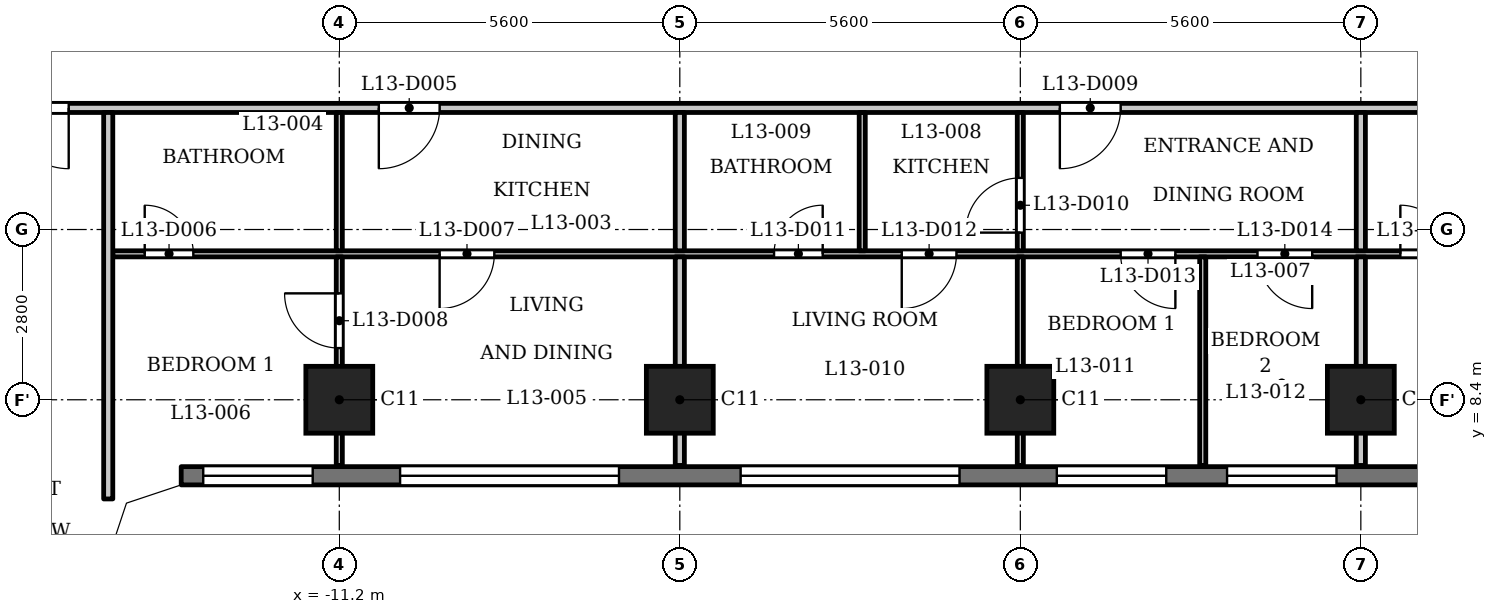
"""IFC4 building model, lengths in metres.
Left out: names, types, materials, properties, quantities, classifications, styles, units other than length and angle.
Written with IfcOpenShell. Run it as: python <this file> out.ifc"""

import sys

from ifc_helpers import new_model, si_unit, direction, frame, frame_2d, origin, origin_2d, place, context, subcontext, project, spatial, polyline, rectangle, outline, extrude, element, fill, save


model = new_model("IFC4")
c1 = context("Model", 3, precision=1e-05, world=origin(), true_north=direction((0.0, 1.0)))
c2 = subcontext(c1, "Body", "Model", "MODEL_VIEW")
j1 = project(units=[si_unit("LENGTHUNIT", "METRE"), si_unit("PLANEANGLEUNIT", "RADIAN")], contexts=[c1])
p1 = place(None, origin())
s1 = spatial("IfcSite", under=j1, at=p1, CompositionType="ELEMENT")
p2 = place(p1, origin())
s2 = spatial("IfcBuilding", under=s1, at=p2, CompositionType="ELEMENT")
p3 = place(p2, frame((0.0, 0.0, 55.0)))
s3 = spatial("IfcBuildingStorey", under=s2, at=p3, CompositionType="ELEMENT", Elevation=55.0)
for number, where, z_axis, x_axis in (
    (1, (-11.2, 8.4, 0.0), (0.0, 0.0, 1.0), (1.0, 0.0, 0.0)),
    (2, (-5.6, 8.4, 0.0), (0.0, 0.0, 1.0), (1.0, 0.0, 0.0)),
    (3, (0.0, 8.4, 0.0), (0.0, 0.0, 1.0), (1.0, 0.0, 0.0)),
    (4, (5.6, 8.4, 0.0), (0.0, 0.0, 1.0), (1.0, 0.0, 0.0)),
):
    element("IfcColumn", number, at=place(p3, frame(where, z_axis=z_axis, x_axis=x_axis)), inside=s3, PredefinedType="COLUMN", context=c2, shape_type="SweptSolid", body=[
        extrude(rectangle(XDim=1.1, YDim=1.1, at=origin_2d()), origin(), (0.0, 0.0, 1.0), 3.5),
    ])
p4 = place(p3, frame((-13.8, 7.15, 0.0), z_axis=(0.0, 0.0, 1.0), x_axis=(1.0, 0.0, 0.0)))
e5 = element("IfcWall", 5, at=p4, inside=s3, PredefinedType="SOLIDWALL", context=c2, shape_type="SweptSolid", body=[
    extrude(rectangle(XDim=27.6, YDim=0.3, at=frame_2d((13.8, 0.0))), origin(), (0.0, 0.0, 1.0), 3.2),
])
p5 = place(p4, frame((0.363, 0.0, 0.9)))
e6 = element("IfcOpeningElement", 6, at=p5, cuts=e5, PredefinedType="OPENING", context=c2, shape_type="SweptSolid", body=[
    extrude(rectangle(XDim=1.8, YDim=1.25, at=frame_2d((0.9, 0.625))), frame((0.0, 0.16, 0.0), z_axis=(0.0, -1.0, 0.0), x_axis=(1.0, 0.0, 0.0)), (0.0, 0.0, 1.0), 0.32),
])
p6 = place(p4, frame((3.6, 0.0, 1.2)))
e7 = element("IfcOpeningElement", 7, at=p6, cuts=e5, PredefinedType="OPENING", context=c2, shape_type="SweptSolid", body=[
    extrude(rectangle(XDim=3.6, YDim=0.95, at=frame_2d((1.8, 0.475))), frame((0.0, 0.16, 0.0), z_axis=(0.0, -1.0, 0.0), x_axis=(1.0, 0.0, 0.0)), (0.0, 0.0, 1.0), 0.32),
])
p7 = place(p4, frame((9.2, 0.0, 1.2)))
e8 = element("IfcOpeningElement", 8, at=p7, cuts=e5, PredefinedType="OPENING", context=c2, shape_type="SweptSolid", body=[
    extrude(rectangle(XDim=3.6, YDim=0.95, at=frame_2d((1.8, 0.475))), frame((0.0, 0.16, 0.0), z_axis=(0.0, -1.0, 0.0), x_axis=(1.0, 0.0, 0.0)), (0.0, 0.0, 1.0), 0.32),
])
p8 = place(p4, frame((14.4, 0.0, 0.9)))
e9 = element("IfcOpeningElement", 9, at=p8, cuts=e5, PredefinedType="OPENING", context=c2, shape_type="SweptSolid", body=[
    extrude(rectangle(XDim=1.8, YDim=1.25, at=frame_2d((0.9, 0.625))), frame((0.0, 0.16, 0.0), z_axis=(0.0, -1.0, 0.0), x_axis=(1.0, 0.0, 0.0)), (0.0, 0.0, 1.0), 0.32),
])
p9 = place(p4, frame((17.2, 0.0, 0.9)))
e10 = element("IfcOpeningElement", 10, at=p9, cuts=e5, PredefinedType="OPENING", context=c2, shape_type="SweptSolid", body=[
    extrude(rectangle(XDim=1.8, YDim=1.25, at=frame_2d((0.9, 0.625))), frame((0.0, 0.16, 0.0), z_axis=(0.0, -1.0, 0.0), x_axis=(1.0, 0.0, 0.0)), (0.0, 0.0, 1.0), 0.32),
])
p10 = place(p4, frame((20.4, 0.0, 1.2)))
e11 = element("IfcOpeningElement", 11, at=p10, cuts=e5, PredefinedType="OPENING", context=c2, shape_type="SweptSolid", body=[
    extrude(rectangle(XDim=3.6, YDim=0.95, at=frame_2d((1.8, 0.475))), frame((0.0, 0.16, 0.0), z_axis=(0.0, -1.0, 0.0), x_axis=(1.0, 0.0, 0.0)), (0.0, 0.0, 1.0), 0.32),
])
p11 = place(p4, frame((25.438, 0.0, 0.9)))
e12 = element("IfcOpeningElement", 12, at=p11, cuts=e5, PredefinedType="OPENING", context=c2, shape_type="SweptSolid", body=[
    extrude(rectangle(XDim=1.8, YDim=1.25, at=frame_2d((0.9, 0.625))), frame((0.0, 0.16, 0.0), z_axis=(0.0, -1.0, 0.0), x_axis=(1.0, 0.0, 0.0)), (0.0, 0.0, 1.0), 0.32),
])
p12 = place(p3, frame((-14.925, 10.8, 0.0), z_axis=(0.0, 0.0, 1.0), x_axis=(1.0, 0.0, 0.0)))
e13 = element("IfcWall", 13, at=p12, inside=s3, PredefinedType="PARTITIONING", context=c2, shape_type="SweptSolid", body=[
    extrude(rectangle(XDim=29.85, YDim=0.1, at=frame_2d((14.925, 0.0))), origin(), (0.0, 0.0, 1.0), 3.2),
])
p13 = place(p12, frame((0.525, 0.0, 0.0)))
e14 = element("IfcOpeningElement", 14, at=p13, cuts=e13, PredefinedType="OPENING", context=c2, shape_type="SweptSolid", body=[
    extrude(rectangle(XDim=0.8, YDim=2.1, at=frame_2d((0.4, 1.05))), frame((0.0, 0.06, 0.0), z_axis=(0.0, -1.0, 0.0), x_axis=(1.0, 0.0, 0.0)), (0.0, 0.0, 1.0), 0.12),
])
p14 = place(p12, frame((5.375, 0.0, 0.0)))
e15 = element("IfcOpeningElement", 15, at=p14, cuts=e13, PredefinedType="OPENING", context=c2, shape_type="SweptSolid", body=[
    extrude(rectangle(XDim=0.9, YDim=2.1, at=frame_2d((0.45, 1.05))), frame((0.0, 0.06, 0.0), z_axis=(0.0, -1.0, 0.0), x_axis=(1.0, 0.0, 0.0)), (0.0, 0.0, 1.0), 0.12),
])
p15 = place(p12, frame((10.875, 0.0, 0.0)))
e16 = element("IfcOpeningElement", 16, at=p15, cuts=e13, PredefinedType="OPENING", context=c2, shape_type="SweptSolid", body=[
    extrude(rectangle(XDim=0.8, YDim=2.1, at=frame_2d((0.4, 1.05))), frame((0.0, 0.06, 0.0), z_axis=(0.0, -1.0, 0.0), x_axis=(1.0, 0.0, 0.0)), (0.0, 0.0, 1.0), 0.12),
])
p16 = place(p12, frame((12.975, 0.0, 0.0)))
e17 = element("IfcOpeningElement", 17, at=p16, cuts=e13, PredefinedType="OPENING", context=c2, shape_type="SweptSolid", body=[
    extrude(rectangle(XDim=0.9, YDim=2.1, at=frame_2d((0.45, 1.05))), frame((0.0, 0.06, 0.0), z_axis=(0.0, -1.0, 0.0), x_axis=(1.0, 0.0, 0.0)), (0.0, 0.0, 1.0), 0.12),
])
p17 = place(p12, frame((16.575, 0.0, 0.0)))
e18 = element("IfcOpeningElement", 18, at=p17, cuts=e13, PredefinedType="OPENING", context=c2, shape_type="SweptSolid", body=[
    extrude(rectangle(XDim=0.9, YDim=2.1, at=frame_2d((0.45, 1.05))), frame((0.0, 0.06, 0.0), z_axis=(0.0, -1.0, 0.0), x_axis=(1.0, 0.0, 0.0)), (0.0, 0.0, 1.0), 0.12),
])
p18 = place(p12, frame((18.825, 0.0, 0.0)))
e19 = element("IfcOpeningElement", 19, at=p18, cuts=e13, PredefinedType="OPENING", context=c2, shape_type="SweptSolid", body=[
    extrude(rectangle(XDim=0.9, YDim=2.1, at=frame_2d((0.45, 1.05))), frame((0.0, 0.06, 0.0), z_axis=(0.0, -1.0, 0.0), x_axis=(1.0, 0.0, 0.0)), (0.0, 0.0, 1.0), 0.12),
])
p19 = place(p12, frame((21.175, 0.0, 0.0)))
e20 = element("IfcOpeningElement", 20, at=p19, cuts=e13, PredefinedType="OPENING", context=c2, shape_type="SweptSolid", body=[
    extrude(rectangle(XDim=0.8, YDim=2.1, at=frame_2d((0.4, 1.05))), frame((0.0, 0.06, 0.0), z_axis=(0.0, -1.0, 0.0), x_axis=(1.0, 0.0, 0.0)), (0.0, 0.0, 1.0), 0.12),
])
p20 = place(p12, frame((27.775, 0.0, 0.0)))
e21 = element("IfcOpeningElement", 21, at=p20, cuts=e13, PredefinedType="OPENING", context=c2, shape_type="SweptSolid", body=[
    extrude(rectangle(XDim=0.9, YDim=2.1, at=frame_2d((0.45, 1.05))), frame((0.0, 0.06, 0.0), z_axis=(0.0, -1.0, 0.0), x_axis=(1.0, 0.0, 0.0)), (0.0, 0.0, 1.0), 0.12),
])
p21 = place(p3, frame((-17.4, 13.2, 0.0), z_axis=(0.0, 0.0, 1.0), x_axis=(1.0, 0.0, 0.0)))
e22 = element("IfcWall", 22, at=p21, inside=s3, PredefinedType="PARTITIONING", context=c2, shape_type="SweptSolid", body=[
    extrude(rectangle(XDim=34.8, YDim=0.15, at=frame_2d((17.4, 0.0))), origin(), (0.0, 0.0, 1.0), 3.2),
])
p22 = place(p21, frame((0.75, 0.0, 0.0)))
e23 = element("IfcOpeningElement", 23, at=p22, cuts=e22, PredefinedType="OPENING", context=c2, shape_type="SweptSolid", body=[
    extrude(rectangle(XDim=1.0, YDim=2.1, at=frame_2d((0.5, 1.05))), frame((0.0, 0.085, 0.0), z_axis=(0.0, -1.0, 0.0), x_axis=(1.0, 0.0, 0.0)), (0.0, 0.0, 1.0), 0.17),
])
p23 = place(p21, frame((33.15, 0.0, 0.0)))
e24 = element("IfcOpeningElement", 24, at=p23, cuts=e22, PredefinedType="OPENING", context=c2, shape_type="SweptSolid", body=[
    extrude(rectangle(XDim=1.0, YDim=2.1, at=frame_2d((0.5, 1.05))), frame((0.0, 0.085, 0.0), z_axis=(0.0, -1.0, 0.0), x_axis=(1.0, 0.0, 0.0)), (0.0, 0.0, 1.0), 0.17),
])
p24 = place(p21, frame((6.85, 0.0, 0.0)))
e25 = element("IfcOpeningElement", 25, at=p24, cuts=e22, PredefinedType="OPENING", context=c2, shape_type="SweptSolid", body=[
    extrude(rectangle(XDim=1.0, YDim=2.1, at=frame_2d((0.5, 1.05))), frame((0.0, 0.085, 0.0), z_axis=(0.0, -1.0, 0.0), x_axis=(1.0, 0.0, 0.0)), (0.0, 0.0, 1.0), 0.17),
])
p25 = place(p21, frame((18.05, 0.0, 0.0)))
e26 = element("IfcOpeningElement", 26, at=p25, cuts=e22, PredefinedType="OPENING", context=c2, shape_type="SweptSolid", body=[
    extrude(rectangle(XDim=1.0, YDim=2.1, at=frame_2d((0.5, 1.05))), frame((0.0, 0.085, 0.0), z_axis=(0.0, -1.0, 0.0), x_axis=(1.0, 0.0, 0.0)), (0.0, 0.0, 1.0), 0.17),
])
p26 = place(p21, frame((29.25, 0.0, 0.0)))
e27 = element("IfcOpeningElement", 27, at=p26, cuts=e22, PredefinedType="OPENING", context=c2, shape_type="SweptSolid", body=[
    extrude(rectangle(XDim=1.0, YDim=2.1, at=frame_2d((0.5, 1.05))), frame((0.0, 0.085, 0.0), z_axis=(0.0, -1.0, 0.0), x_axis=(1.0, 0.0, 0.0)), (0.0, 0.0, 1.0), 0.17),
])
p27 = place(p3, frame((-15.0, 6.769, 0.0), z_axis=(0.0, 0.0, 1.0), x_axis=(0.0, 1.0, 0.0)))
e28 = element("IfcWall", 28, at=p27, inside=s3, PredefinedType="PARTITIONING", context=c2, shape_type="SweptSolid", body=[
    extrude(rectangle(XDim=6.356, YDim=0.15, at=frame_2d((3.178, 0.0))), origin(), (0.0, 0.0, 1.0), 3.2),
])
p28 = place(p3, frame((-11.2, 7.32, 0.0), z_axis=(0.0, 0.0, 1.0), x_axis=(0.0, 1.0, 0.0)))
e29 = element("IfcWall", 29, at=p28, inside=s3, PredefinedType="PARTITIONING", context=c2, shape_type="SweptSolid", body=[
    extrude(rectangle(XDim=3.43, YDim=0.1, at=frame_2d((1.715, 0.0))), origin(), (0.0, 0.0, 1.0), 3.2),
])
p29 = place(p28, frame((1.93, 0.0, 0.0)))
e30 = element("IfcOpeningElement", 30, at=p29, cuts=e29, PredefinedType="OPENING", context=c2, shape_type="SweptSolid", body=[
    extrude(rectangle(XDim=0.9, YDim=2.1, at=frame_2d((0.45, 1.05))), frame((0.0, 0.06, 0.0), z_axis=(0.0, -1.0, 0.0), x_axis=(1.0, 0.0, 0.0)), (0.0, 0.0, 1.0), 0.12),
])
p30 = place(p3, frame((-11.2, 10.85, 0.0), z_axis=(0.0, 0.0, 1.0), x_axis=(0.0, 1.0, 0.0)))
e31 = element("IfcWall", 31, at=p30, inside=s3, PredefinedType="PARTITIONING", context=c2, shape_type="SweptSolid", body=[
    extrude(rectangle(XDim=2.275, YDim=0.1, at=frame_2d((1.137, 0.0))), origin(), (0.0, 0.0, 1.0), 3.2),
])
p31 = place(p3, frame((-5.6, 7.32, 0.0), z_axis=(0.0, 0.0, 1.0), x_axis=(0.0, 1.0, 0.0)))
e32 = element("IfcWall", 32, at=p31, inside=s3, PredefinedType="PARTITIONING", context=c2, shape_type="SweptSolid", body=[
    extrude(rectangle(XDim=3.43, YDim=0.15, at=frame_2d((1.715, 0.0))), origin(), (0.0, 0.0, 1.0), 3.2),
])
p32 = place(p3, frame((-5.6, 10.85, 0.0), z_axis=(0.0, 0.0, 1.0), x_axis=(0.0, 1.0, 0.0)))
e33 = element("IfcWall", 33, at=p32, inside=s3, PredefinedType="PARTITIONING", context=c2, shape_type="SweptSolid", body=[
    extrude(rectangle(XDim=2.275, YDim=0.15, at=frame_2d((1.137, 0.0))), origin(), (0.0, 0.0, 1.0), 3.2),
])
p33 = place(p3, frame((-2.6, 10.85, 0.0), z_axis=(0.0, 0.0, 1.0), x_axis=(0.0, 1.0, 0.0)))
e34 = element("IfcWall", 34, at=p33, inside=s3, PredefinedType="PARTITIONING", context=c2, shape_type="SweptSolid", body=[
    extrude(rectangle(XDim=2.275, YDim=0.1, at=frame_2d((1.137, 0.0))), origin(), (0.0, 0.0, 1.0), 3.2),
])
p34 = place(p3, frame((0.0, 7.32, 0.0), z_axis=(0.0, 0.0, 1.0), x_axis=(0.0, 1.0, 0.0)))
e35 = element("IfcWall", 35, at=p34, inside=s3, PredefinedType="PARTITIONING", context=c2, shape_type="SweptSolid", body=[
    extrude(rectangle(XDim=3.43, YDim=0.1, at=frame_2d((1.715, 0.0))), origin(), (0.0, 0.0, 1.0), 3.2),
])
p35 = place(p3, frame((0.0, 10.85, 0.0), z_axis=(0.0, 0.0, 1.0), x_axis=(0.0, 1.0, 0.0)))
e36 = element("IfcWall", 36, at=p35, inside=s3, PredefinedType="PARTITIONING", context=c2, shape_type="SweptSolid", body=[
    extrude(rectangle(XDim=2.275, YDim=0.1, at=frame_2d((1.137, 0.0))), origin(), (0.0, 0.0, 1.0), 3.2),
])
p36 = place(p35, frame((0.299, 0.0, 0.0)))
e37 = element("IfcOpeningElement", 37, at=p36, cuts=e36, PredefinedType="OPENING", context=c2, shape_type="SweptSolid", body=[
    extrude(rectangle(XDim=0.9, YDim=2.1, at=frame_2d((0.45, 1.05))), frame((0.0, 0.06, 0.0), z_axis=(0.0, -1.0, 0.0), x_axis=(1.0, 0.0, 0.0)), (0.0, 0.0, 1.0), 0.12),
])
p37 = place(p3, frame((3.0, 7.32, 0.0), z_axis=(0.0, 0.0, 1.0), x_axis=(0.0, 1.0, 0.0)))
e38 = element("IfcWall", 38, at=p37, inside=s3, PredefinedType="PARTITIONING", context=c2, shape_type="SweptSolid", body=[
    extrude(rectangle(XDim=3.43, YDim=0.1, at=frame_2d((1.715, 0.0))), origin(), (0.0, 0.0, 1.0), 3.2),
])
p38 = place(p3, frame((5.6, 7.32, 0.0), z_axis=(0.0, 0.0, 1.0), x_axis=(0.0, 1.0, 0.0)))
e39 = element("IfcWall", 39, at=p38, inside=s3, PredefinedType="PARTITIONING", context=c2, shape_type="SweptSolid", body=[
    extrude(rectangle(XDim=3.43, YDim=0.15, at=frame_2d((1.715, 0.0))), origin(), (0.0, 0.0, 1.0), 3.2),
])
p39 = place(p3, frame((5.6, 10.85, 0.0), z_axis=(0.0, 0.0, 1.0), x_axis=(0.0, 1.0, 0.0)))
e40 = element("IfcWall", 40, at=p39, inside=s3, PredefinedType="PARTITIONING", context=c2, shape_type="SweptSolid", body=[
    extrude(rectangle(XDim=2.275, YDim=0.15, at=frame_2d((1.137, 0.0))), origin(), (0.0, 0.0, 1.0), 3.2),
])
p40 = place(p3, origin())
e41 = element("IfcWall", 41, at=p40, inside=s3, PredefinedType="SOLIDWALL", context=c2, shape_type="SweptSolid", body=[
    extrude(outline(polyline([(-13.849, 7.3), (-14.937, 6.937), (-15.3, 5.849), (-15.3, 5.8), (-15.0, 5.8), (-14.7, 6.7), (-13.8, 7.0), (-13.8, 7.3), (-13.849, 7.3)])), origin(), (0.0, 0.0, 1.0), 3.2),
])
p41 = place(p22, origin())
e42 = element("IfcDoor", 42, at=p41, inside=s3, OperationType="SINGLE_SWING_RIGHT", PredefinedType="DOOR", context=c2, shape_type="SweptSolid", body=[
    extrude(rectangle(XDim=1.0, YDim=2.1, at=frame_2d((0.5, 1.05))), frame((0.0, 0.025, 0.0), z_axis=(0.0, -1.0, 0.0), x_axis=(1.0, 0.0, 0.0)), (0.0, 0.0, 1.0), 0.05),
])
fill(e23, e42)
p42 = place(p24, origin())
e43 = element("IfcDoor", 43, at=p42, inside=s3, OperationType="SINGLE_SWING_LEFT", PredefinedType="DOOR", context=c2, shape_type="SweptSolid", body=[
    extrude(rectangle(XDim=1.0, YDim=2.1, at=frame_2d((0.5, 1.05))), frame((0.0, 0.025, 0.0), z_axis=(0.0, -1.0, 0.0), x_axis=(1.0, 0.0, 0.0)), (0.0, 0.0, 1.0), 0.05),
])
fill(e25, e43)
p43 = place(p13, origin())
e44 = element("IfcDoor", 44, at=p43, inside=s3, OperationType="SINGLE_SWING_RIGHT", PredefinedType="DOOR", context=c2, shape_type="SweptSolid", body=[
    extrude(rectangle(XDim=0.8, YDim=2.1, at=frame_2d((0.4, 1.05))), frame((0.0, 0.025, 0.0), z_axis=(0.0, -1.0, 0.0), x_axis=(1.0, 0.0, 0.0)), (0.0, 0.0, 1.0), 0.05),
])
fill(e14, e44)
p44 = place(p14, origin())
e45 = element("IfcDoor", 45, at=p44, inside=s3, OperationType="SINGLE_SWING_LEFT", PredefinedType="DOOR", context=c2, shape_type="SweptSolid", body=[
    extrude(rectangle(XDim=0.9, YDim=2.1, at=frame_2d((0.45, 1.05))), frame((0.0, 0.025, 0.0), z_axis=(0.0, -1.0, 0.0), x_axis=(1.0, 0.0, 0.0)), (0.0, 0.0, 1.0), 0.05),
])
fill(e15, e45)
p45 = place(p29, origin())
e46 = element("IfcDoor", 46, at=p45, inside=s3, OperationType="SINGLE_SWING_LEFT", PredefinedType="DOOR", context=c2, shape_type="SweptSolid", body=[
    extrude(rectangle(XDim=0.9, YDim=2.1, at=frame_2d((0.45, 1.05))), frame((0.0, 0.025, 0.0), z_axis=(0.0, -1.0, 0.0), x_axis=(1.0, 0.0, 0.0)), (0.0, 0.0, 1.0), 0.05),
])
fill(e30, e46)
p46 = place(p25, origin())
e47 = element("IfcDoor", 47, at=p46, inside=s3, OperationType="SINGLE_SWING_LEFT", PredefinedType="DOOR", context=c2, shape_type="SweptSolid", body=[
    extrude(rectangle(XDim=1.0, YDim=2.1, at=frame_2d((0.5, 1.05))), frame((0.0, 0.025, 0.0), z_axis=(0.0, -1.0, 0.0), x_axis=(1.0, 0.0, 0.0)), (0.0, 0.0, 1.0), 0.05),
])
fill(e26, e47)
p47 = place(p36, origin())
e48 = element("IfcDoor", 48, at=p47, inside=s3, OperationType="SINGLE_SWING_RIGHT", PredefinedType="DOOR", context=c2, shape_type="SweptSolid", body=[
    extrude(rectangle(XDim=0.9, YDim=2.1, at=frame_2d((0.45, 1.05))), frame((0.0, 0.025, 0.0), z_axis=(0.0, -1.0, 0.0), x_axis=(1.0, 0.0, 0.0)), (0.0, 0.0, 1.0), 0.05),
])
fill(e37, e48)
p48 = place(p15, origin())
e49 = element("IfcDoor", 49, at=p48, inside=s3, OperationType="SINGLE_SWING_LEFT", PredefinedType="DOOR", context=c2, shape_type="SweptSolid", body=[
    extrude(rectangle(XDim=0.8, YDim=2.1, at=frame_2d((0.4, 1.05))), frame((0.0, 0.025, 0.0), z_axis=(0.0, -1.0, 0.0), x_axis=(1.0, 0.0, 0.0)), (0.0, 0.0, 1.0), 0.05),
])
fill(e16, e49)
p49 = place(p16, origin())
e50 = element("IfcDoor", 50, at=p49, inside=s3, OperationType="SINGLE_SWING_LEFT", PredefinedType="DOOR", context=c2, shape_type="SweptSolid", body=[
    extrude(rectangle(XDim=0.9, YDim=2.1, at=frame_2d((0.45, 1.05))), frame((0.0, 0.025, 0.0), z_axis=(0.0, -1.0, 0.0), x_axis=(1.0, 0.0, 0.0)), (0.0, 0.0, 1.0), 0.05),
])
fill(e17, e50)
p50 = place(p17, origin())
e51 = element("IfcDoor", 51, at=p50, inside=s3, OperationType="SINGLE_SWING_RIGHT", PredefinedType="DOOR", context=c2, shape_type="SweptSolid", body=[
    extrude(rectangle(XDim=0.9, YDim=2.1, at=frame_2d((0.45, 1.05))), frame((0.0, 0.025, 0.0), z_axis=(0.0, -1.0, 0.0), x_axis=(1.0, 0.0, 0.0)), (0.0, 0.0, 1.0), 0.05),
])
fill(e18, e51)
p51 = place(p18, origin())
e52 = element("IfcDoor", 52, at=p51, inside=s3, OperationType="SINGLE_SWING_RIGHT", PredefinedType="DOOR", context=c2, shape_type="SweptSolid", body=[
    extrude(rectangle(XDim=0.9, YDim=2.1, at=frame_2d((0.45, 1.05))), frame((0.0, 0.025, 0.0), z_axis=(0.0, -1.0, 0.0), x_axis=(1.0, 0.0, 0.0)), (0.0, 0.0, 1.0), 0.05),
])
fill(e19, e52)
p52 = place(p19, origin())
e53 = element("IfcDoor", 53, at=p52, inside=s3, OperationType="SINGLE_SWING_RIGHT", PredefinedType="DOOR", context=c2, shape_type="SweptSolid", body=[
    extrude(rectangle(XDim=0.8, YDim=2.1, at=frame_2d((0.4, 1.05))), frame((0.0, 0.025, 0.0), z_axis=(0.0, -1.0, 0.0), x_axis=(1.0, 0.0, 0.0)), (0.0, 0.0, 1.0), 0.05),
])
fill(e20, e53)
p53 = place(p5, origin())
e54 = element("IfcWindow", 54, at=p53, inside=s3, PartitioningType="SINGLE_PANEL", PredefinedType="WINDOW", context=c2, shape_type="SweptSolid", body=[
    extrude(rectangle(XDim=1.8, YDim=1.25, at=frame_2d((0.9, 0.625))), frame((0.0, 0.03, 0.0), z_axis=(0.0, -1.0, 0.0), x_axis=(1.0, 0.0, 0.0)), (0.0, 0.0, 1.0), 0.06),
])
fill(e6, e54)
p54 = place(p6, origin())
e55 = element("IfcWindow", 55, at=p54, inside=s3, PartitioningType="SINGLE_PANEL", PredefinedType="WINDOW", context=c2, shape_type="SweptSolid", body=[
    extrude(rectangle(XDim=3.6, YDim=0.95, at=frame_2d((1.8, 0.475))), frame((0.0, 0.03, 0.0), z_axis=(0.0, -1.0, 0.0), x_axis=(1.0, 0.0, 0.0)), (0.0, 0.0, 1.0), 0.06),
])
fill(e7, e55)
p55 = place(p7, origin())
e56 = element("IfcWindow", 56, at=p55, inside=s3, PartitioningType="SINGLE_PANEL", PredefinedType="WINDOW", context=c2, shape_type="SweptSolid", body=[
    extrude(rectangle(XDim=3.6, YDim=0.95, at=frame_2d((1.8, 0.475))), frame((0.0, 0.03, 0.0), z_axis=(0.0, -1.0, 0.0), x_axis=(1.0, 0.0, 0.0)), (0.0, 0.0, 1.0), 0.06),
])
fill(e8, e56)
p56 = place(p8, origin())
e57 = element("IfcWindow", 57, at=p56, inside=s3, PartitioningType="SINGLE_PANEL", PredefinedType="WINDOW", context=c2, shape_type="SweptSolid", body=[
    extrude(rectangle(XDim=1.8, YDim=1.25, at=frame_2d((0.9, 0.625))), frame((0.0, 0.03, 0.0), z_axis=(0.0, -1.0, 0.0), x_axis=(1.0, 0.0, 0.0)), (0.0, 0.0, 1.0), 0.06),
])
fill(e9, e57)
p57 = place(p9, origin())
e58 = element("IfcWindow", 58, at=p57, inside=s3, PartitioningType="SINGLE_PANEL", PredefinedType="WINDOW", context=c2, shape_type="SweptSolid", body=[
    extrude(rectangle(XDim=1.8, YDim=1.25, at=frame_2d((0.9, 0.625))), frame((0.0, 0.03, 0.0), z_axis=(0.0, -1.0, 0.0), x_axis=(1.0, 0.0, 0.0)), (0.0, 0.0, 1.0), 0.06),
])
fill(e10, e58)
save(model, sys.argv[1])
